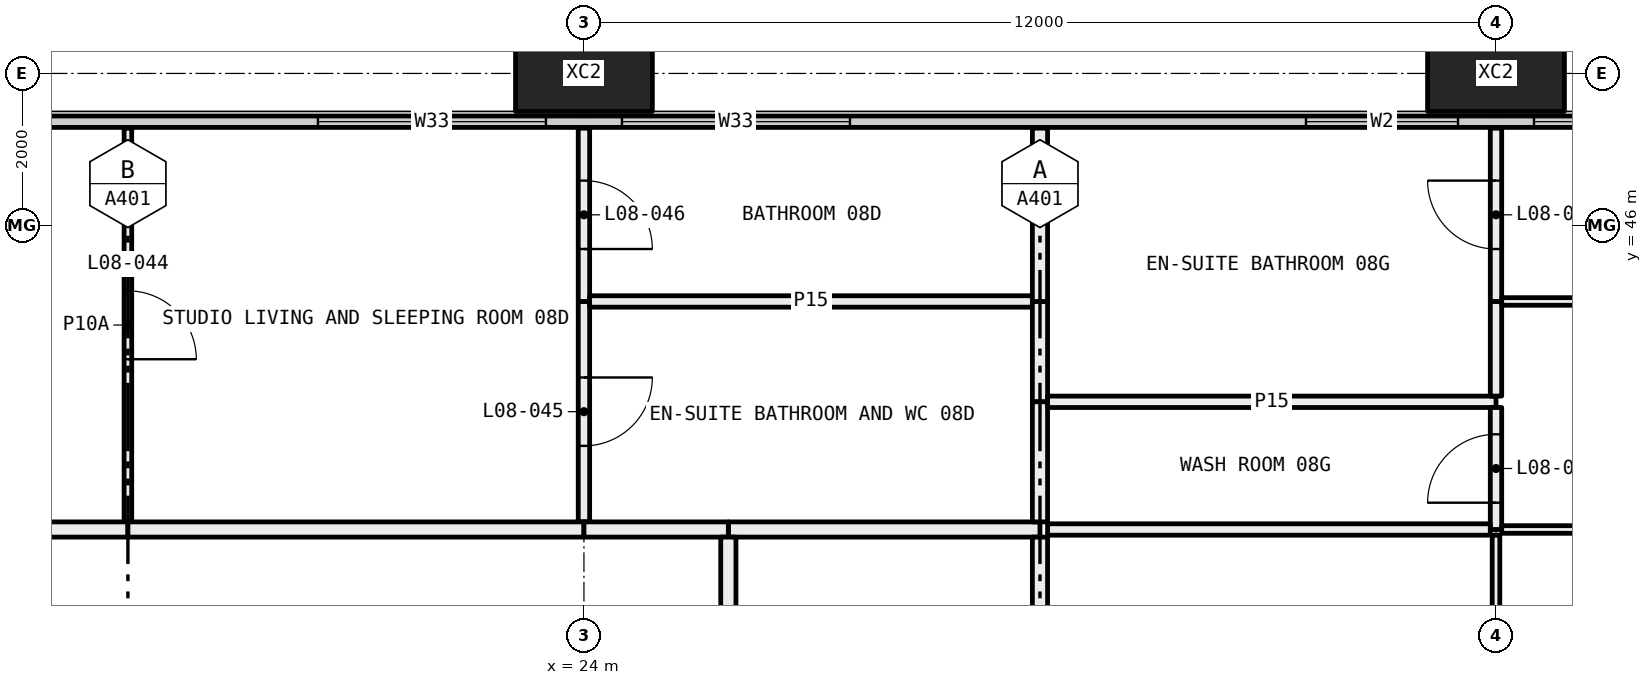
"""IFC4 building model, lengths in metres.
Left out: names, types, materials, properties, quantities, classifications, styles, units other than length and angle.
Written with IfcOpenShell. Run it as: python <this file> out.ifc"""

import sys

from ifc_helpers import new_model, si_unit, direction, frame, frame_2d, origin, origin_2d, place, context, subcontext, project, spatial, rectangle, hollow_rectangle, extrude, element, fill, save


model = new_model("IFC4")
c1 = context("Model", 3, precision=1e-05, world=origin(), true_north=direction((0.0, 1.0)))
c2 = subcontext(c1, "Body", "Model", "MODEL_VIEW")
j1 = project(units=[si_unit("LENGTHUNIT", "METRE"), si_unit("PLANEANGLEUNIT", "RADIAN")], contexts=[c1])
p1 = place(None, origin())
s1 = spatial("IfcSite", under=j1, at=p1, CompositionType="ELEMENT")
p2 = place(p1, origin())
s2 = spatial("IfcBuilding", under=s1, at=p2, CompositionType="ELEMENT")
p3 = place(p2, frame((0.0, 0.0, 40.35)))
s3 = spatial("IfcBuildingStorey", under=s2, at=p3, CompositionType="ELEMENT", Elevation=40.35)
for number, where, z_axis, x_axis in (
    (1, (24.0, 48.0, -0.4), (0.0, 0.0, 1.0), (1.0, 0.0, 0.0)),
    (2, (36.0, 48.0, -0.4), (0.0, 0.0, 1.0), (1.0, 0.0, 0.0)),
):
    element("IfcColumn", number, at=place(p3, frame(where, z_axis=z_axis, x_axis=x_axis)), inside=s3, PredefinedType="COLUMN", context=c2, shape_type="SweptSolid", body=[
        extrude(hollow_rectangle(XDim=1.8, YDim=1.0, WallThickness=0.07, at=origin_2d()), origin(), (0.0, 0.0, 1.0), 3.45),
    ])
p4 = place(p3, frame((6.56, 47.365, 0.0), z_axis=(0.0, 0.0, 1.0), x_axis=(1.0, 0.0, 0.0)))
e3 = element("IfcWall", 3, at=p4, inside=s3, PredefinedType="ELEMENTEDWALL", context=c2, shape_type="SweptSolid", body=[
    extrude(rectangle(XDim=58.88, YDim=0.15, at=frame_2d((29.44, 0.0))), origin(), (0.0, 0.0, 1.0), 3.05),
])
p5 = place(p4, frame((0.44, 0.0, 0.45)))
e4 = element("IfcOpeningElement", 4, at=p5, cuts=e3, PredefinedType="OPENING", context=c2, shape_type="SweptSolid", body=[
    extrude(rectangle(XDim=4.5, YDim=2.55, at=frame_2d((2.25, 1.275))), frame((0.0, 0.085, 0.0), z_axis=(0.0, -1.0, 0.0), x_axis=(1.0, 0.0, 0.0)), (0.0, 0.0, 1.0), 0.17),
])
p6 = place(p4, frame((5.94, 0.0, 0.45)))
e5 = element("IfcOpeningElement", 5, at=p6, cuts=e3, PredefinedType="OPENING", context=c2, shape_type="SweptSolid", body=[
    extrude(rectangle(XDim=3.0, YDim=2.55, at=frame_2d((1.5, 1.275))), frame((0.0, 0.085, 0.0), z_axis=(0.0, -1.0, 0.0), x_axis=(1.0, 0.0, 0.0)), (0.0, 0.0, 1.0), 0.17),
])
p7 = place(p4, frame((13.94, 0.0, 0.45)))
e6 = element("IfcOpeningElement", 6, at=p7, cuts=e3, PredefinedType="OPENING", context=c2, shape_type="SweptSolid", body=[
    extrude(rectangle(XDim=3.0, YDim=2.55, at=frame_2d((1.5, 1.275))), frame((0.0, 0.085, 0.0), z_axis=(0.0, -1.0, 0.0), x_axis=(1.0, 0.0, 0.0)), (0.0, 0.0, 1.0), 0.17),
])
p8 = place(p4, frame((17.94, 0.0, 0.45)))
e7 = element("IfcOpeningElement", 7, at=p8, cuts=e3, PredefinedType="OPENING", context=c2, shape_type="SweptSolid", body=[
    extrude(rectangle(XDim=3.0, YDim=2.55, at=frame_2d((1.5, 1.275))), frame((0.0, 0.085, 0.0), z_axis=(0.0, -1.0, 0.0), x_axis=(1.0, 0.0, 0.0)), (0.0, 0.0, 1.0), 0.17),
])
p9 = place(p4, frame((26.94, 0.0, 0.45)))
e8 = element("IfcOpeningElement", 8, at=p9, cuts=e3, PredefinedType="OPENING", context=c2, shape_type="SweptSolid", body=[
    extrude(rectangle(XDim=2.0, YDim=2.55, at=frame_2d((1.0, 1.275))), frame((0.0, 0.085, 0.0), z_axis=(0.0, -1.0, 0.0), x_axis=(1.0, 0.0, 0.0)), (0.0, 0.0, 1.0), 0.17),
])
p10 = place(p4, frame((29.94, 0.0, 0.45)))
e9 = element("IfcOpeningElement", 9, at=p10, cuts=e3, PredefinedType="OPENING", context=c2, shape_type="SweptSolid", body=[
    extrude(rectangle(XDim=3.0, YDim=2.55, at=frame_2d((1.5, 1.275))), frame((0.0, 0.085, 0.0), z_axis=(0.0, -1.0, 0.0), x_axis=(1.0, 0.0, 0.0)), (0.0, 0.0, 1.0), 0.17),
])
p11 = place(p4, frame((37.94, 0.0, 0.45)))
e10 = element("IfcOpeningElement", 10, at=p11, cuts=e3, PredefinedType="OPENING", context=c2, shape_type="SweptSolid", body=[
    extrude(rectangle(XDim=3.0, YDim=2.55, at=frame_2d((1.5, 1.275))), frame((0.0, 0.085, 0.0), z_axis=(0.0, -1.0, 0.0), x_axis=(1.0, 0.0, 0.0)), (0.0, 0.0, 1.0), 0.17),
])
p12 = place(p4, frame((41.94, 0.0, 0.45)))
e11 = element("IfcOpeningElement", 11, at=p12, cuts=e3, PredefinedType="OPENING", context=c2, shape_type="SweptSolid", body=[
    extrude(rectangle(XDim=3.0, YDim=2.55, at=frame_2d((1.5, 1.275))), frame((0.0, 0.085, 0.0), z_axis=(0.0, -1.0, 0.0), x_axis=(1.0, 0.0, 0.0)), (0.0, 0.0, 1.0), 0.17),
])
p13 = place(p4, frame((50.94, 0.0, 0.45)))
e12 = element("IfcOpeningElement", 12, at=p13, cuts=e3, PredefinedType="OPENING", context=c2, shape_type="SweptSolid", body=[
    extrude(rectangle(XDim=2.0, YDim=2.55, at=frame_2d((1.0, 1.275))), frame((0.0, 0.085, 0.0), z_axis=(0.0, -1.0, 0.0), x_axis=(1.0, 0.0, 0.0)), (0.0, 0.0, 1.0), 0.17),
])
p14 = place(p4, frame((53.94, 0.0, 0.45)))
e13 = element("IfcOpeningElement", 13, at=p14, cuts=e3, PredefinedType="OPENING", context=c2, shape_type="SweptSolid", body=[
    extrude(rectangle(XDim=4.5, YDim=2.55, at=frame_2d((2.25, 1.275))), frame((0.0, 0.085, 0.0), z_axis=(0.0, -1.0, 0.0), x_axis=(1.0, 0.0, 0.0)), (0.0, 0.0, 1.0), 0.17),
])
p15 = place(p3, frame((18.0, 42.1, 0.0), z_axis=(0.0, 0.0, 1.0), x_axis=(0.0, 1.0, 0.0)))
e14 = element("IfcWall", 14, at=p15, inside=s3, PredefinedType="PARTITIONING", context=c2, shape_type="SweptSolid", body=[
    extrude(rectangle(XDim=5.18, YDim=0.1, at=frame_2d((2.59, 0.0))), origin(), (0.0, 0.0, 1.0), 3.05),
])
p16 = place(p15, frame((2.14, 0.0, 0.0)))
e15 = element("IfcOpeningElement", 15, at=p16, cuts=e14, PredefinedType="OPENING", context=c2, shape_type="SweptSolid", body=[
    extrude(rectangle(XDim=0.9, YDim=2.1, at=frame_2d((0.45, 1.05))), frame((0.0, 0.06, 0.0), z_axis=(0.0, -1.0, 0.0), x_axis=(1.0, 0.0, 0.0)), (0.0, 0.0, 1.0), 0.12),
])
p17 = place(p3, frame((12.0, 42.0, 0.0), z_axis=(0.0, 0.0, 1.0), x_axis=(1.0, 0.0, 0.0)))
e16 = element("IfcWall", 16, at=p17, inside=s3, PredefinedType="PARTITIONING", context=c2, shape_type="SweptSolid", body=[
    extrude(rectangle(XDim=6.0, YDim=0.2, at=frame_2d((3.0, 0.0))), origin(), (0.0, 0.0, 1.0), 3.05),
])
p18 = place(p17, frame((2.5, 0.0, 0.0)))
e17 = element("IfcOpeningElement", 17, at=p18, cuts=e16, PredefinedType="OPENING", context=c2, shape_type="SweptSolid", body=[
    extrude(rectangle(XDim=1.0, YDim=2.1, at=frame_2d((0.5, 1.05))), frame((0.0, 0.11, 0.0), z_axis=(0.0, -1.0, 0.0), x_axis=(1.0, 0.0, 0.0)), (0.0, 0.0, 1.0), 0.22),
])
p19 = place(p3, frame((24.0, 42.1, 0.0), z_axis=(0.0, 0.0, 1.0), x_axis=(0.0, 1.0, 0.0)))
e18 = element("IfcWall", 18, at=p19, inside=s3, PredefinedType="PARTITIONING", context=c2, shape_type="SweptSolid", body=[
    extrude(rectangle(XDim=2.9, YDim=0.15, at=frame_2d((1.45, 0.0))), origin(), (0.0, 0.0, 1.0), 3.05),
])
p20 = place(p19, frame((1.0, 0.0, 0.0)))
e19 = element("IfcOpeningElement", 19, at=p20, cuts=e18, PredefinedType="OPENING", context=c2, shape_type="SweptSolid", body=[
    extrude(rectangle(XDim=0.9, YDim=2.1, at=frame_2d((0.45, 1.05))), frame((0.0, 0.085, 0.0), z_axis=(0.0, -1.0, 0.0), x_axis=(1.0, 0.0, 0.0)), (0.0, 0.0, 1.0), 0.17),
])
p21 = place(p3, frame((24.0, 45.0, 0.0), z_axis=(0.0, 0.0, 1.0), x_axis=(0.0, 1.0, 0.0)))
e20 = element("IfcWall", 20, at=p21, inside=s3, PredefinedType="PARTITIONING", context=c2, shape_type="SweptSolid", body=[
    extrude(rectangle(XDim=2.28, YDim=0.15, at=frame_2d((1.14, 0.0))), origin(), (0.0, 0.0, 1.0), 3.05),
])
p22 = place(p21, frame((0.69, 0.0, 0.0)))
e21 = element("IfcOpeningElement", 21, at=p22, cuts=e20, PredefinedType="OPENING", context=c2, shape_type="SweptSolid", body=[
    extrude(rectangle(XDim=0.9, YDim=2.1, at=frame_2d((0.45, 1.05))), frame((0.0, 0.085, 0.0), z_axis=(0.0, -1.0, 0.0), x_axis=(1.0, 0.0, 0.0)), (0.0, 0.0, 1.0), 0.17),
])
p23 = place(p3, frame((18.0, 42.0, 0.0), z_axis=(0.0, 0.0, 1.0), x_axis=(1.0, 0.0, 0.0)))
e22 = element("IfcWall", 22, at=p23, inside=s3, PredefinedType="PARTITIONING", context=c2, shape_type="SweptSolid", body=[
    extrude(rectangle(XDim=6.0, YDim=0.2, at=frame_2d((3.0, 0.0))), origin(), (0.0, 0.0, 1.0), 3.05),
])
p24 = place(p3, frame((29.9, 45.0, 0.0), z_axis=(0.0, 0.0, 1.0), x_axis=(-1.0, 0.0, 0.0)))
e23 = element("IfcWall", 23, at=p24, inside=s3, PredefinedType="PARTITIONING", context=c2, shape_type="SweptSolid", body=[
    extrude(rectangle(XDim=5.825, YDim=0.15, at=frame_2d((2.913, 0.0))), origin(), (0.0, 0.0, 1.0), 3.05),
])
p25 = place(p3, frame((25.9, 42.0, 0.0), z_axis=(0.0, 0.0, 1.0), x_axis=(1.0, 0.0, 0.0)))
e24 = element("IfcWall", 24, at=p25, inside=s3, PredefinedType="PARTITIONING", context=c2, shape_type="SweptSolid", body=[
    extrude(rectangle(XDim=4.1, YDim=0.2, at=frame_2d((2.05, 0.0))), origin(), (0.0, 0.0, 1.0), 3.05),
])
p26 = place(p3, frame((30.0, 43.68, 0.0), z_axis=(0.0, 0.0, 1.0), x_axis=(0.0, 1.0, 0.0)))
e25 = element("IfcWall", 25, at=p26, inside=s3, PredefinedType="PARTITIONING", context=c2, shape_type="SweptSolid", body=[
    extrude(rectangle(XDim=1.32, YDim=0.2, at=frame_2d((0.66, 0.0))), origin(), (0.0, 0.0, 1.0), 3.05),
])
p27 = place(p3, frame((30.0, 42.1, 0.0), z_axis=(0.0, 0.0, 1.0), x_axis=(0.0, 1.0, 0.0)))
e26 = element("IfcWall", 26, at=p27, inside=s3, PredefinedType="PARTITIONING", context=c2, shape_type="SweptSolid", body=[
    extrude(rectangle(XDim=1.58, YDim=0.2, at=frame_2d((0.79, 0.0))), origin(), (0.0, 0.0, 1.0), 3.05),
])
p28 = place(p3, frame((24.0, 42.0, 0.0), z_axis=(0.0, 0.0, 1.0), x_axis=(1.0, 0.0, 0.0)))
e27 = element("IfcWall", 27, at=p28, inside=s3, PredefinedType="PARTITIONING", context=c2, shape_type="SweptSolid", body=[
    extrude(rectangle(XDim=1.9, YDim=0.2, at=frame_2d((0.95, 0.0))), origin(), (0.0, 0.0, 1.0), 3.05),
])
p29 = place(p3, frame((30.0, 45.0, 0.0), z_axis=(0.0, 0.0, 1.0), x_axis=(0.0, 1.0, 0.0)))
e28 = element("IfcWall", 28, at=p29, inside=s3, PredefinedType="PARTITIONING", context=c2, shape_type="SweptSolid", body=[
    extrude(rectangle(XDim=2.28, YDim=0.2, at=frame_2d((1.14, 0.0))), origin(), (0.0, 0.0, 1.0), 3.05),
])
p30 = place(p3, frame((30.0, 36.1, 0.0), z_axis=(0.0, 0.0, 1.0), x_axis=(0.0, 1.0, 0.0)))
e29 = element("IfcWall", 29, at=p30, inside=s3, PredefinedType="PARTITIONING", context=c2, shape_type="SweptSolid", body=[
    extrude(rectangle(XDim=5.8, YDim=0.2, at=frame_2d((2.9, 0.0))), origin(), (0.0, 0.0, 1.0), 3.05),
])
p31 = place(p3, frame((25.9, 41.9, 0.0), z_axis=(0.0, 0.0, 1.0), x_axis=(0.0, -1.0, 0.0)))
e30 = element("IfcWall", 30, at=p31, inside=s3, PredefinedType="PARTITIONING", context=c2, shape_type="SweptSolid", body=[
    extrude(rectangle(XDim=6.0, YDim=0.2, at=frame_2d((3.0, 0.0))), origin(), (0.0, 0.0, 1.0), 2.45),
])
p32 = place(p31, frame((2.55, 0.0, 0.0)))
e31 = element("IfcOpeningElement", 31, at=p32, cuts=e30, PredefinedType="OPENING", context=c2, shape_type="SweptSolid", body=[
    extrude(rectangle(XDim=0.9, YDim=2.1, at=frame_2d((0.45, 1.05))), frame((0.0, 0.11, 0.0), z_axis=(0.0, -1.0, 0.0), x_axis=(1.0, 0.0, 0.0)), (0.0, 0.0, 1.0), 0.22),
])
p33 = place(p3, frame((30.1, 43.68, 0.0), z_axis=(0.0, 0.0, 1.0), x_axis=(1.0, 0.0, 0.0)))
e32 = element("IfcWall", 32, at=p33, inside=s3, PredefinedType="PARTITIONING", context=c2, shape_type="SweptSolid", body=[
    extrude(rectangle(XDim=5.9, YDim=0.15, at=frame_2d((2.95, 0.0))), origin(), (0.0, 0.0, 1.0), 2.45),
])
p34 = place(p3, frame((36.0, 43.755, 0.0), z_axis=(0.0, 0.0, 1.0), x_axis=(0.0, 1.0, 0.0)))
e33 = element("IfcWall", 33, at=p34, inside=s3, PredefinedType="PARTITIONING", context=c2, shape_type="SweptSolid", body=[
    extrude(rectangle(XDim=1.245, YDim=0.15, at=frame_2d((0.623, 0.0))), origin(), (0.0, 0.0, 1.0), 2.45),
])
p35 = place(p3, frame((36.0, 45.0, 0.0), z_axis=(0.0, 0.0, 1.0), x_axis=(0.0, 1.0, 0.0)))
e34 = element("IfcWall", 34, at=p35, inside=s3, PredefinedType="PARTITIONING", context=c2, shape_type="SweptSolid", body=[
    extrude(rectangle(XDim=2.28, YDim=0.15, at=frame_2d((1.14, 0.0))), origin(), (0.0, 0.0, 1.0), 2.45),
])
p36 = place(p35, frame((0.69, 0.0, 0.0)))
e35 = element("IfcOpeningElement", 35, at=p36, cuts=e34, PredefinedType="OPENING", context=c2, shape_type="SweptSolid", body=[
    extrude(rectangle(XDim=0.9, YDim=2.1, at=frame_2d((0.45, 1.05))), frame((0.0, 0.085, 0.0), z_axis=(0.0, -1.0, 0.0), x_axis=(1.0, 0.0, 0.0)), (0.0, 0.0, 1.0), 0.17),
])
p37 = place(p3, frame((36.0, 42.0, 0.0), z_axis=(0.0, 0.0, 1.0), x_axis=(0.0, 1.0, 0.0)))
e36 = element("IfcWall", 36, at=p37, inside=s3, PredefinedType="PARTITIONING", context=c2, shape_type="SweptSolid", body=[
    extrude(rectangle(XDim=1.605, YDim=0.15, at=frame_2d((0.802, 0.0))), origin(), (0.0, 0.0, 1.0), 2.45),
])
p38 = place(p37, frame((0.353, 0.0, 0.0)))
e37 = element("IfcOpeningElement", 37, at=p38, cuts=e36, PredefinedType="OPENING", context=c2, shape_type="SweptSolid", body=[
    extrude(rectangle(XDim=0.9, YDim=2.1, at=frame_2d((0.45, 1.05))), frame((0.0, 0.085, 0.0), z_axis=(0.0, -1.0, 0.0), x_axis=(1.0, 0.0, 0.0)), (0.0, 0.0, 1.0), 0.17),
])
p39 = place(p3, frame((30.1, 42.0, 0.0), z_axis=(0.0, 0.0, 1.0), x_axis=(1.0, 0.0, 0.0)))
e38 = element("IfcWall", 38, at=p39, inside=s3, PredefinedType="PARTITIONING", context=c2, shape_type="SweptSolid", body=[
    extrude(rectangle(XDim=5.825, YDim=0.15, at=frame_2d((2.913, 0.0))), origin(), (0.0, 0.0, 1.0), 2.45),
])
p40 = place(p3, frame((48.0, 45.0, 0.0), z_axis=(0.0, 0.0, 1.0), x_axis=(-1.0, 0.0, 0.0)))
e39 = element("IfcWall", 39, at=p40, inside=s3, PredefinedType="PARTITIONING", context=c2, shape_type="SweptSolid", body=[
    extrude(rectangle(XDim=11.925, YDim=0.1, at=frame_2d((5.962, 0.0))), origin(), (0.0, 0.0, 1.0), 2.45),
])
p41 = place(p40, frame((5.512, 0.0, 0.0)))
e40 = element("IfcOpeningElement", 40, at=p41, cuts=e39, PredefinedType="OPENING", context=c2, shape_type="SweptSolid", body=[
    extrude(rectangle(XDim=0.9, YDim=2.1, at=frame_2d((0.45, 1.05))), frame((0.0, 0.06, 0.0), z_axis=(0.0, -1.0, 0.0), x_axis=(1.0, 0.0, 0.0)), (0.0, 0.0, 1.0), 0.12),
])
p42 = place(p3, frame((36.075, 42.0, 0.0), z_axis=(0.0, 0.0, 1.0), x_axis=(1.0, 0.0, 0.0)))
e41 = element("IfcWall", 41, at=p42, inside=s3, PredefinedType="PARTITIONING", context=c2, shape_type="SweptSolid", body=[
    extrude(rectangle(XDim=5.85, YDim=0.1, at=frame_2d((2.925, 0.0))), origin(), (0.0, 0.0, 1.0), 2.45),
])
p43 = place(p42, frame((2.475, 0.0, 0.0)))
e42 = element("IfcOpeningElement", 42, at=p43, cuts=e41, PredefinedType="OPENING", context=c2, shape_type="SweptSolid", body=[
    extrude(rectangle(XDim=0.9, YDim=2.1, at=frame_2d((0.45, 1.05))), frame((0.0, 0.06, 0.0), z_axis=(0.0, -1.0, 0.0), x_axis=(1.0, 0.0, 0.0)), (0.0, 0.0, 1.0), 0.12),
])
p44 = place(p3, frame((36.0, 36.8, 0.0), z_axis=(0.0, 0.0, 1.0), x_axis=(0.0, 1.0, 0.0)))
e43 = element("IfcWall", 43, at=p44, inside=s3, PredefinedType="PARTITIONING", context=c2, shape_type="SweptSolid", body=[
    extrude(rectangle(XDim=5.125, YDim=0.1, at=frame_2d((2.562, 0.0))), origin(), (0.0, 0.0, 1.0), 2.45),
])
p45 = place(p44, frame((2.113, 0.0, 0.0)))
e44 = element("IfcOpeningElement", 44, at=p45, cuts=e43, PredefinedType="OPENING", context=c2, shape_type="SweptSolid", body=[
    extrude(rectangle(XDim=0.9, YDim=2.1, at=frame_2d((0.45, 1.05))), frame((0.0, 0.06, 0.0), z_axis=(0.0, -1.0, 0.0), x_axis=(1.0, 0.0, 0.0)), (0.0, 0.0, 1.0), 0.12),
])
p46 = place(p7, origin())
e45 = element("IfcWindow", 45, at=p46, inside=s3, PartitioningType="SINGLE_PANEL", PredefinedType="WINDOW", context=c2, shape_type="SweptSolid", body=[
    extrude(rectangle(XDim=3.0, YDim=2.55, at=frame_2d((1.5, 1.275))), frame((0.0, 0.03, 0.0), z_axis=(0.0, -1.0, 0.0), x_axis=(1.0, 0.0, 0.0)), (0.0, 0.0, 1.0), 0.06),
])
fill(e6, e45)
p47 = place(p8, origin())
e46 = element("IfcWindow", 46, at=p47, inside=s3, PartitioningType="SINGLE_PANEL", PredefinedType="WINDOW", context=c2, shape_type="SweptSolid", body=[
    extrude(rectangle(XDim=3.0, YDim=2.55, at=frame_2d((1.5, 1.275))), frame((0.0, 0.03, 0.0), z_axis=(0.0, -1.0, 0.0), x_axis=(1.0, 0.0, 0.0)), (0.0, 0.0, 1.0), 0.06),
])
fill(e7, e46)
p48 = place(p9, origin())
e47 = element("IfcWindow", 47, at=p48, inside=s3, PartitioningType="SINGLE_PANEL", PredefinedType="WINDOW", context=c2, shape_type="SweptSolid", body=[
    extrude(rectangle(XDim=2.0, YDim=2.55, at=frame_2d((1.0, 1.275))), frame((0.0, 0.03, 0.0), z_axis=(0.0, -1.0, 0.0), x_axis=(1.0, 0.0, 0.0)), (0.0, 0.0, 1.0), 0.06),
])
fill(e8, e47)
p49 = place(p10, origin())
e48 = element("IfcWindow", 48, at=p49, inside=s3, PartitioningType="SINGLE_PANEL", PredefinedType="WINDOW", context=c2, shape_type="SweptSolid", body=[
    extrude(rectangle(XDim=3.0, YDim=2.55, at=frame_2d((1.5, 1.275))), frame((0.0, 0.03, 0.0), z_axis=(0.0, -1.0, 0.0), x_axis=(1.0, 0.0, 0.0)), (0.0, 0.0, 1.0), 0.06),
])
fill(e9, e48)
p50 = place(p16, frame((0.9, 0.0, 0.0), x_axis=(-1.0, 0.0, 0.0)))
e49 = element("IfcDoor", 49, at=p50, inside=s3, OperationType="SINGLE_SWING_LEFT", PredefinedType="DOOR", context=c2, shape_type="SweptSolid", body=[
    extrude(rectangle(XDim=0.9, YDim=2.1, at=frame_2d((0.45, 1.05))), frame((0.0, 0.025, 0.0), z_axis=(0.0, -1.0, 0.0), x_axis=(1.0, 0.0, 0.0)), (0.0, 0.0, 1.0), 0.05),
])
fill(e15, e49)
p51 = place(p20, frame((0.9, 0.0, 0.0), x_axis=(-1.0, 0.0, 0.0)))
e50 = element("IfcDoor", 50, at=p51, inside=s3, OperationType="SINGLE_SWING_RIGHT", PredefinedType="DOOR", context=c2, shape_type="SweptSolid", body=[
    extrude(rectangle(XDim=0.9, YDim=2.1, at=frame_2d((0.45, 1.05))), frame((0.0, 0.025, 0.0), z_axis=(0.0, -1.0, 0.0), x_axis=(1.0, 0.0, 0.0)), (0.0, 0.0, 1.0), 0.05),
])
fill(e19, e50)
p52 = place(p22, frame((0.9, 0.0, 0.0), x_axis=(-1.0, 0.0, 0.0)))
e51 = element("IfcDoor", 51, at=p52, inside=s3, OperationType="SINGLE_SWING_LEFT", PredefinedType="DOOR", context=c2, shape_type="SweptSolid", body=[
    extrude(rectangle(XDim=0.9, YDim=2.1, at=frame_2d((0.45, 1.05))), frame((0.0, 0.025, 0.0), z_axis=(0.0, -1.0, 0.0), x_axis=(1.0, 0.0, 0.0)), (0.0, 0.0, 1.0), 0.05),
])
fill(e21, e51)
p53 = place(p36, origin())
e52 = element("IfcDoor", 52, at=p53, inside=s3, OperationType="SINGLE_SWING_LEFT", PredefinedType="DOOR", context=c2, shape_type="SweptSolid", body=[
    extrude(rectangle(XDim=0.9, YDim=2.1, at=frame_2d((0.45, 1.05))), frame((0.0, 0.025, 0.0), z_axis=(0.0, -1.0, 0.0), x_axis=(1.0, 0.0, 0.0)), (0.0, 0.0, 1.0), 0.05),
])
fill(e35, e52)
p54 = place(p38, origin())
e53 = element("IfcDoor", 53, at=p54, inside=s3, OperationType="SINGLE_SWING_RIGHT", PredefinedType="DOOR", context=c2, shape_type="SweptSolid", body=[
    extrude(rectangle(XDim=0.9, YDim=2.1, at=frame_2d((0.45, 1.05))), frame((0.0, 0.025, 0.0), z_axis=(0.0, -1.0, 0.0), x_axis=(1.0, 0.0, 0.0)), (0.0, 0.0, 1.0), 0.05),
])
fill(e37, e53)
save(model, sys.argv[1])
